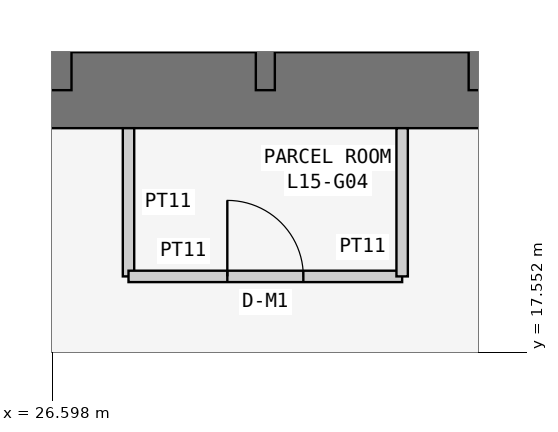
"""IFC4 building model, lengths in metres.
Left out: names, types, materials, properties, quantities, classifications, styles, units other than length and angle.
Written with IfcOpenShell. Run it as: python <this file> out.ifc"""

import sys

from ifc_helpers import new_model, si_unit, direction, frame, frame_2d, origin, place, context, subcontext, project, spatial, rectangle, extrude, element, fill, save


model = new_model("IFC4")
c1 = context("Model", 3, precision=1e-05, world=origin(), true_north=direction((0.0, 1.0)))
c2 = subcontext(c1, "Body", "Model", "MODEL_VIEW")
j1 = project(units=[si_unit("LENGTHUNIT", "METRE"), si_unit("PLANEANGLEUNIT", "RADIAN")], contexts=[c1])
p1 = place(None, origin())
s1 = spatial("IfcSite", under=j1, at=p1, CompositionType="ELEMENT")
p2 = place(p1, origin())
s2 = spatial("IfcBuilding", under=s1, at=p2, CompositionType="ELEMENT")
p3 = place(p2, frame((0.0, 0.0, 63.3)))
s3 = spatial("IfcBuildingStorey", under=s2, at=p3, CompositionType="ELEMENT", Elevation=63.3)
p4 = place(p3, frame((21.0, 21.0, 0.0), z_axis=(0.0, 0.0, 1.0), x_axis=(1.0, 0.0, 0.0)))
e1 = element("IfcWall", 1, at=p4, inside=s3, PredefinedType="SHEAR", context=c2, shape_type="SweptSolid", body=[
    extrude(rectangle(XDim=17.3, YDim=1.0, at=frame_2d((8.65, 0.0))), origin(), (0.0, 0.0, 1.0), 3.6),
])
p5 = place(p3, frame((26.6, 21.0, 0.0), z_axis=(0.0, 0.0, 1.0), x_axis=(0.0, 1.0, 0.0)))
e2 = element("IfcWall", 2, at=p5, inside=s3, PredefinedType="SHEAR", context=c2, shape_type="SweptSolid", body=[
    extrude(rectangle(XDim=16.8, YDim=0.5, at=frame_2d((8.4, 0.0))), origin(), (0.0, 0.0, 1.0), 3.6),
])
p6 = place(p5, frame((10.4, 0.0, 0.0)))
e3 = element("IfcOpeningElement", 3, at=p6, cuts=e2, PredefinedType="OPENING", context=c2, shape_type="SweptSolid", body=[
    extrude(rectangle(XDim=1.2, YDim=2.1, at=frame_2d((0.6, 1.05))), frame((0.0, 0.26, 0.0), z_axis=(0.0, -1.0, 0.0), x_axis=(1.0, 0.0, 0.0)), (0.0, 0.0, 1.0), 0.52),
])
for number, where, z_axis, x_axis in (
    (4, (29.4, 21.0, 0.0), (0.0, 0.0, 1.0), (0.0, 1.0, 0.0)),
    (5, (32.2, 21.0, 0.0), (0.0, 0.0, 1.0), (0.0, 1.0, 0.0)),
):
    element("IfcWall", number, at=place(p3, frame(where, z_axis=z_axis, x_axis=x_axis)), inside=s3, PredefinedType="SHEAR", context=c2, shape_type="SweptSolid", body=[
        extrude(rectangle(XDim=3.2, YDim=0.25, at=frame_2d((1.6, 0.0))), origin(), (0.0, 0.0, 1.0), 3.6),
    ])
p7 = place(p3, frame((27.6, 20.5, 0.0), z_axis=(0.0, 0.0, 1.0), x_axis=(0.0, -1.0, 0.0)))
e6 = element("IfcWall", 6, at=p7, inside=s3, PredefinedType="PARTITIONING", context=c2, shape_type="SweptSolid", body=[
    extrude(rectangle(XDim=1.95, YDim=0.15, at=frame_2d((0.975, 0.0))), origin(), (0.0, 0.0, 1.0), 3.45),
])
p8 = place(p3, frame((27.6, 18.55, 0.0), z_axis=(0.0, 0.0, 1.0), x_axis=(1.0, 0.0, 0.0)))
e7 = element("IfcWall", 7, at=p8, inside=s3, PredefinedType="PARTITIONING", context=c2, shape_type="SweptSolid", body=[
    extrude(rectangle(XDim=3.6, YDim=0.15, at=frame_2d((1.8, 0.0))), origin(), (0.0, 0.0, 1.0), 3.45),
])
p9 = place(p8, frame((1.3, 0.0, 0.0)))
e8 = element("IfcOpeningElement", 8, at=p9, cuts=e7, PredefinedType="OPENING", context=c2, shape_type="SweptSolid", body=[
    extrude(rectangle(XDim=1.0, YDim=2.1, at=frame_2d((0.5, 1.05))), frame((0.0, 0.085, 0.0), z_axis=(0.0, -1.0, 0.0), x_axis=(1.0, 0.0, 0.0)), (0.0, 0.0, 1.0), 0.17),
])
p10 = place(p3, frame((31.2, 18.55, 0.0), z_axis=(0.0, 0.0, 1.0), x_axis=(0.0, 1.0, 0.0)))
e9 = element("IfcWall", 9, at=p10, inside=s3, PredefinedType="PARTITIONING", context=c2, shape_type="SweptSolid", body=[
    extrude(rectangle(XDim=1.95, YDim=0.15, at=frame_2d((0.975, 0.0))), origin(), (0.0, 0.0, 1.0), 3.45),
])
p11 = place(p9, origin())
e10 = element("IfcDoor", 10, at=p11, inside=s3, OperationType="SINGLE_SWING_LEFT", PredefinedType="DOOR", context=c2, shape_type="SweptSolid", body=[
    extrude(rectangle(XDim=1.0, YDim=2.1, at=frame_2d((0.5, 1.05))), frame((0.0, 0.025, 0.0), z_axis=(0.0, -1.0, 0.0), x_axis=(1.0, 0.0, 0.0)), (0.0, 0.0, 1.0), 0.05),
])
fill(e8, e10)
save(model, sys.argv[1])
